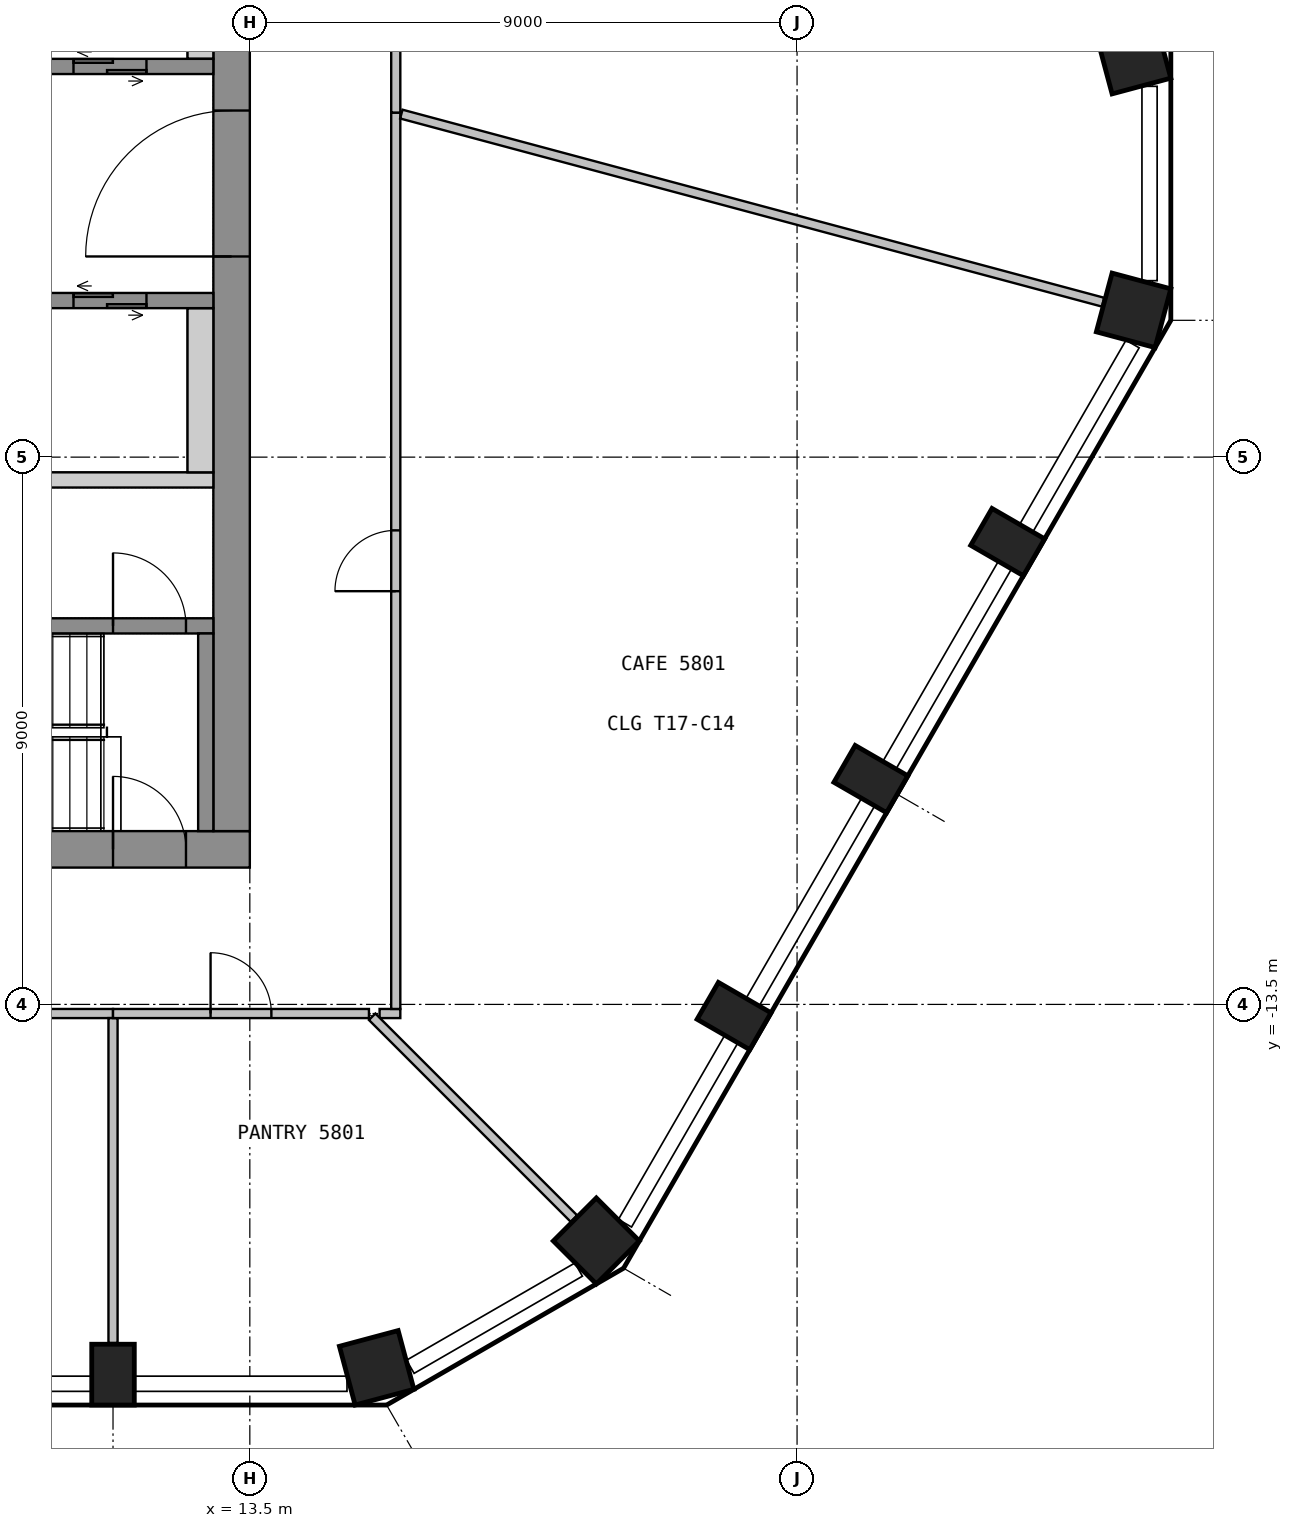
"""IFC4 building model, lengths in metres.
Left out: names, types, materials, properties, quantities, classifications, styles, units other than length and angle.
Written with IfcOpenShell. Run it as: python <this file> out.ifc"""

import sys

from ifc_helpers import new_model, si_unit, direction, frame, frame_2d, origin, origin_2d, place, context, subcontext, project, spatial, polyline, rectangle, outline, extrude, element, fill, save


model = new_model("IFC4")
c1 = context("Model", 3, precision=1e-05, world=origin(), true_north=direction((0.0, 1.0)))
c2 = subcontext(c1, "Body", "Model", "MODEL_VIEW")
j1 = project(units=[si_unit("LENGTHUNIT", "METRE"), si_unit("PLANEANGLEUNIT", "RADIAN")], contexts=[c1])
p1 = place(None, origin())
s1 = spatial("IfcSite", under=j1, at=p1, CompositionType="ELEMENT")
p2 = place(p1, origin())
s2 = spatial("IfcBuilding", under=s1, at=p2, CompositionType="ELEMENT")
p3 = place(p2, frame((0.0, 0.0, 235.2)))
s3 = spatial("IfcBuildingStorey", under=s2, at=p3, CompositionType="ELEMENT", Elevation=235.2)
p4 = place(p3, frame((11.25, -19.588, 0.0), z_axis=(0.0, 0.0, 1.0), x_axis=(1.0, 0.0, 0.0)))
e1 = element("IfcColumn", 1, at=p4, inside=s3, PredefinedType="COLUMN", context=c2, shape_type="SweptSolid", body=[
    extrude(rectangle(XDim=0.7, YDim=1.0, at=origin_2d()), origin(), (0.0, 0.0, 1.0), 3.575),
])
for number, where, z_axis, x_axis in (
    (2, (15.586, -19.476, 0.0), (0.0, 0.0, 1.0), (0.966, 0.259, 0.0)),
    (3, (19.199, -17.39, 0.0), (0.0, 0.0, 1.0), (0.707, 0.707, 0.0)),
):
    element("IfcColumn", number, at=place(p3, frame(where, z_axis=z_axis, x_axis=x_axis)), inside=s3, PredefinedType="COLUMN", context=c2, shape_type="SweptSolid", body=[
        extrude(rectangle(XDim=1.0, YDim=1.0, at=origin_2d()), origin(), (0.0, 0.0, 1.0), 3.575),
    ])
for number, where, z_axis, x_axis in (
    (4, (21.464, -13.691, 0.0), (0.0, 0.0, 1.0), (0.5, 0.866, 0.0)),
    (5, (23.714, -9.794, 0.0), (0.0, 0.0, 1.0), (0.5, 0.866, 0.0)),
    (6, (25.964, -5.897, 0.0), (0.0, 0.0, 1.0), (0.5, 0.866, 0.0)),
):
    element("IfcColumn", number, at=place(p3, frame(where, z_axis=z_axis, x_axis=x_axis)), inside=s3, PredefinedType="COLUMN", context=c2, shape_type="SweptSolid", body=[
        extrude(rectangle(XDim=0.7, YDim=1.0, at=origin_2d()), origin(), (0.0, 0.0, 1.0), 3.575),
    ])
for number, where, z_axis, x_axis in (
    (7, (28.035, -2.086, 0.0), (0.0, 0.0, 1.0), (0.259, 0.966, 0.0)),
    (8, (28.035, 2.086, 0.0), (0.0, 0.0, 1.0), (-0.259, 0.966, 0.0)),
):
    element("IfcColumn", number, at=place(p3, frame(where, z_axis=z_axis, x_axis=x_axis)), inside=s3, PredefinedType="COLUMN", context=c2, shape_type="SweptSolid", body=[
        extrude(rectangle(XDim=1.0, YDim=1.0, at=origin_2d()), origin(), (0.0, 0.0, 1.0), 3.575),
    ])
p5 = place(p3, frame((-13.5, -10.95, 0.0), z_axis=(0.0, 0.0, 1.0), x_axis=(1.0, 0.0, 0.0)))
e9 = element("IfcWall", 9, at=p5, inside=s3, PredefinedType="SHEAR", context=c2, shape_type="SweptSolid", body=[
    extrude(rectangle(XDim=27.0, YDim=0.6, at=frame_2d((13.5, 0.0))), origin(), (0.0, 0.0, 1.0), 3.575),
])
p6 = place(p5, frame((12.3, 0.0, 0.0)))
e10 = element("IfcOpeningElement", 10, at=p6, cuts=e9, PredefinedType="OPENING", context=c2, shape_type="SweptSolid", body=[
    extrude(rectangle(XDim=2.4, YDim=2.1, at=frame_2d((1.2, 1.05))), frame((0.0, 0.31, 0.0), z_axis=(0.0, -1.0, 0.0), x_axis=(1.0, 0.0, 0.0)), (0.0, 0.0, 1.0), 0.62),
])
p7 = place(p5, frame((1.05, 0.0, 0.0)))
e11 = element("IfcOpeningElement", 11, at=p7, cuts=e9, PredefinedType="OPENING", context=c2, shape_type="SweptSolid", body=[
    extrude(rectangle(XDim=1.2, YDim=2.1, at=frame_2d((0.6, 1.05))), frame((0.0, 0.31, 0.0), z_axis=(0.0, -1.0, 0.0), x_axis=(1.0, 0.0, 0.0)), (0.0, 0.0, 1.0), 0.62),
])
p8 = place(p5, frame((24.75, 0.0, 0.0)))
e12 = element("IfcOpeningElement", 12, at=p8, cuts=e9, PredefinedType="OPENING", context=c2, shape_type="SweptSolid", body=[
    extrude(rectangle(XDim=1.2, YDim=2.1, at=frame_2d((0.6, 1.05))), frame((0.0, 0.31, 0.0), z_axis=(0.0, -1.0, 0.0), x_axis=(1.0, 0.0, 0.0)), (0.0, 0.0, 1.0), 0.62),
])
p9 = place(p3, frame((13.2, -10.65, 0.0), z_axis=(0.0, 0.0, 1.0), x_axis=(0.0, 1.0, 0.0)))
e13 = element("IfcWall", 13, at=p9, inside=s3, PredefinedType="SHEAR", context=c2, shape_type="SweptSolid", body=[
    extrude(rectangle(XDim=21.3, YDim=0.6, at=frame_2d((10.65, 0.0))), origin(), (0.0, 0.0, 1.0), 3.575),
])
p10 = place(p9, frame((9.45, 0.0, 0.0)))
e14 = element("IfcOpeningElement", 14, at=p10, cuts=e13, PredefinedType="OPENING", context=c2, shape_type="SweptSolid", body=[
    extrude(rectangle(XDim=2.4, YDim=2.1, at=frame_2d((1.2, 1.05))), frame((0.0, 0.31, 0.0), z_axis=(0.0, -1.0, 0.0), x_axis=(1.0, 0.0, 0.0)), (0.0, 0.0, 1.0), 0.62),
])
p11 = place(p3, origin())
e15 = element("IfcWall", 15, at=p11, inside=s3, PredefinedType="SHEAR", context=c2, shape_type="SweptSolid", body=[
    extrude(outline(polyline([(12.475, 2.05), (12.9, 2.05), (12.9, 4.75), (12.475, 4.75), (12.475, 2.05)])), origin(), (0.0, 0.0, 1.0), 3.575),
])
p12 = place(p3, frame((9.675, 1.925, 0.0), z_axis=(0.0, 0.0, 1.0), x_axis=(1.0, 0.0, 0.0)))
e16 = element("IfcWall", 16, at=p12, inside=s3, PredefinedType="SHEAR", context=c2, shape_type="SweptSolid", body=[
    extrude(rectangle(XDim=3.225, YDim=0.25, at=frame_2d((1.612, 0.0))), origin(), (0.0, 0.0, 1.0), 3.575),
])
p13 = place(p12, frame((0.925, 0.0, 0.0)))
e17 = element("IfcOpeningElement", 17, at=p13, cuts=e16, PredefinedType="OPENING", context=c2, shape_type="SweptSolid", body=[
    extrude(rectangle(XDim=1.2, YDim=2.1, at=frame_2d((0.6, 1.05))), frame((0.0, 0.135, 0.0), z_axis=(0.0, -1.0, 0.0), x_axis=(1.0, 0.0, 0.0)), (0.0, 0.0, 1.0), 0.27),
])
p14 = place(p3, origin())
e18 = element("IfcWall", 18, at=p14, inside=s3, PredefinedType="SHEAR", context=c2, shape_type="SweptSolid", body=[
    extrude(outline(polyline([(-1.525, -5.0), (12.9, -5.0), (12.9, -4.75), (-1.525, -4.75), (-1.525, -5.0)])), origin(), (0.0, 0.0, 1.0), 3.575),
])
p15 = place(p3, origin())
e19 = element("IfcWall", 19, at=p15, inside=s3, PredefinedType="SHEAR", context=c2, shape_type="SweptSolid", body=[
    extrude(outline(polyline([(12.475, -4.75), (12.9, -4.75), (12.9, -2.05), (12.475, -2.05), (12.475, -4.75)])), origin(), (0.0, 0.0, 1.0), 3.575),
])
p16 = place(p3, frame((-1.525, -1.925, 0.0), z_axis=(0.0, 0.0, 1.0), x_axis=(1.0, 0.0, 0.0)))
e20 = element("IfcWall", 20, at=p16, inside=s3, PredefinedType="SHEAR", context=c2, shape_type="SweptSolid", body=[
    extrude(rectangle(XDim=14.425, YDim=0.25, at=frame_2d((7.212, 0.0))), origin(), (0.0, 0.0, 1.0), 3.575),
])
p17 = place(p16, frame((0.925, 0.0, 0.0)))
e21 = element("IfcOpeningElement", 21, at=p17, cuts=e20, PredefinedType="OPENING", context=c2, shape_type="SweptSolid", body=[
    extrude(rectangle(XDim=1.2, YDim=2.1, at=frame_2d((0.6, 1.05))), frame((0.0, 0.135, 0.0), z_axis=(0.0, -1.0, 0.0), x_axis=(1.0, 0.0, 0.0)), (0.0, 0.0, 1.0), 0.27),
])
p18 = place(p16, frame((3.725, 0.0, 0.0)))
e22 = element("IfcOpeningElement", 22, at=p18, cuts=e20, PredefinedType="OPENING", context=c2, shape_type="SweptSolid", body=[
    extrude(rectangle(XDim=1.2, YDim=2.1, at=frame_2d((0.6, 1.05))), frame((0.0, 0.135, 0.0), z_axis=(0.0, -1.0, 0.0), x_axis=(1.0, 0.0, 0.0)), (0.0, 0.0, 1.0), 0.27),
])
p19 = place(p16, frame((6.525, 0.0, 0.0)))
e23 = element("IfcOpeningElement", 23, at=p19, cuts=e20, PredefinedType="OPENING", context=c2, shape_type="SweptSolid", body=[
    extrude(rectangle(XDim=1.2, YDim=2.1, at=frame_2d((0.6, 1.05))), frame((0.0, 0.135, 0.0), z_axis=(0.0, -1.0, 0.0), x_axis=(1.0, 0.0, 0.0)), (0.0, 0.0, 1.0), 0.27),
])
p20 = place(p16, frame((9.325, 0.0, 0.0)))
e24 = element("IfcOpeningElement", 24, at=p20, cuts=e20, PredefinedType="OPENING", context=c2, shape_type="SweptSolid", body=[
    extrude(rectangle(XDim=1.2, YDim=2.1, at=frame_2d((0.6, 1.05))), frame((0.0, 0.135, 0.0), z_axis=(0.0, -1.0, 0.0), x_axis=(1.0, 0.0, 0.0)), (0.0, 0.0, 1.0), 0.27),
])
p21 = place(p16, frame((12.125, 0.0, 0.0)))
e25 = element("IfcOpeningElement", 25, at=p21, cuts=e20, PredefinedType="OPENING", context=c2, shape_type="SweptSolid", body=[
    extrude(rectangle(XDim=1.2, YDim=2.1, at=frame_2d((0.6, 1.05))), frame((0.0, 0.135, 0.0), z_axis=(0.0, -1.0, 0.0), x_axis=(1.0, 0.0, 0.0)), (0.0, 0.0, 1.0), 0.27),
])
p22 = place(p3, frame((2.8, -7.275, 0.0), z_axis=(0.0, 0.0, 1.0), x_axis=(1.0, 0.0, 0.0)))
e26 = element("IfcWall", 26, at=p22, inside=s3, PredefinedType="SHEAR", context=c2, shape_type="SweptSolid", body=[
    extrude(rectangle(XDim=10.1, YDim=0.25, at=frame_2d((5.05, 0.0))), origin(), (0.0, 0.0, 1.0), 3.575),
])
p23 = place(p22, frame((8.45, 0.0, 0.0)))
e27 = element("IfcOpeningElement", 27, at=p23, cuts=e26, PredefinedType="OPENING", context=c2, shape_type="SweptSolid", body=[
    extrude(rectangle(XDim=1.2, YDim=2.1, at=frame_2d((0.6, 1.05))), frame((0.0, 0.135, 0.0), z_axis=(0.0, -1.0, 0.0), x_axis=(1.0, 0.0, 0.0)), (0.0, 0.0, 1.0), 0.27),
])
p24 = place(p3, frame((12.775, -10.65, 0.0), z_axis=(0.0, 0.0, 1.0), x_axis=(0.0, 1.0, 0.0)))
e28 = element("IfcWall", 28, at=p24, inside=s3, PredefinedType="SHEAR", context=c2, shape_type="SweptSolid", body=[
    extrude(rectangle(XDim=3.25, YDim=0.25, at=frame_2d((1.625, 0.0))), origin(), (0.0, 0.0, 1.0), 3.575),
])
p25 = place(p3, frame((-6.75, -13.65, 0.0), z_axis=(0.0, 0.0, 1.0), x_axis=(1.0, 0.0, 0.0)))
e29 = element("IfcWall", 29, at=p25, inside=s3, PredefinedType="PARTITIONING", context=c2, shape_type="SweptSolid", body=[
    extrude(rectangle(XDim=18.0, YDim=0.15, at=frame_2d((9.0, 0.0))), origin(), (0.0, 0.0, 1.0), 3.575),
])
p26 = place(p25, frame((8.5, 0.0, 0.0)))
e30 = element("IfcOpeningElement", 30, at=p26, cuts=e29, PredefinedType="OPENING", context=c2, shape_type="SweptSolid", body=[
    extrude(rectangle(XDim=1.0, YDim=2.1, at=frame_2d((0.5, 1.05))), frame((0.0, 0.085, 0.0), z_axis=(0.0, -1.0, 0.0), x_axis=(1.0, 0.0, 0.0)), (0.0, 0.0, 1.0), 0.17),
])
p27 = place(p3, frame((11.25, -13.725, 0.0), z_axis=(0.0, 0.0, 1.0), x_axis=(0.0, -1.0, 0.0)))
e31 = element("IfcWall", 31, at=p27, inside=s3, PredefinedType="PARTITIONING", context=c2, shape_type="SweptSolid", body=[
    extrude(rectangle(XDim=5.344, YDim=0.15, at=frame_2d((2.672, 0.0))), origin(), (0.0, 0.0, 1.0), 3.575),
])
p28 = place(p3, frame((11.25, -13.65, 0.0), z_axis=(0.0, 0.0, 1.0), x_axis=(1.0, 0.0, 0.0)))
e32 = element("IfcWall", 32, at=p28, inside=s3, PredefinedType="PARTITIONING", context=c2, shape_type="SweptSolid", body=[
    extrude(rectangle(XDim=4.209, YDim=0.15, at=frame_2d((2.104, 0.0))), origin(), (0.0, 0.0, 1.0), 3.575),
])
p29 = place(p28, frame((1.604, 0.0, 0.0)))
e33 = element("IfcOpeningElement", 33, at=p29, cuts=e32, PredefinedType="OPENING", context=c2, shape_type="SweptSolid", body=[
    extrude(rectangle(XDim=1.0, YDim=2.1, at=frame_2d((0.5, 1.05))), frame((0.0, 0.085, 0.0), z_axis=(0.0, -1.0, 0.0), x_axis=(1.0, 0.0, 0.0)), (0.0, 0.0, 1.0), 0.17),
])
p30 = place(p3, frame((15.634, -13.65, 0.0), z_axis=(0.0, 0.0, 1.0), x_axis=(1.0, 0.0, 0.0)))
e34 = element("IfcWall", 34, at=p30, inside=s3, PredefinedType="PARTITIONING", context=c2, shape_type="SweptSolid", body=[
    extrude(rectangle(XDim=0.341, YDim=0.15, at=frame_2d((0.17, 0.0))), origin(), (0.0, 0.0, 1.0), 3.575),
])
p31 = place(p3, frame((15.512, -13.703, 0.0), z_axis=(0.0, 0.0, 1.0), x_axis=(0.707002756653, -0.707210790419, 0.0)))
e35 = element("IfcWall", 35, at=p31, inside=s3, PredefinedType="PARTITIONING", context=c2, shape_type="SweptSolid", body=[
    extrude(rectangle(XDim=4.694, YDim=0.15, at=frame_2d((2.347, 0.0))), origin(), (0.0, 0.0, 1.0), 3.575),
])
p32 = place(p3, frame((15.9, -13.575, 0.0), z_axis=(0.0, 0.0, 1.0), x_axis=(0.0, 1.0, 0.0)))
e36 = element("IfcWall", 36, at=p32, inside=s3, PredefinedType="PARTITIONING", context=c2, shape_type="SweptSolid", body=[
    extrude(rectangle(XDim=14.741, YDim=0.15, at=frame_2d((7.371, 0.0))), origin(), (0.0, 0.0, 1.0), 3.575),
])
p33 = place(p32, frame((6.871, 0.0, 0.0)))
e37 = element("IfcOpeningElement", 37, at=p33, cuts=e36, PredefinedType="OPENING", context=c2, shape_type="SweptSolid", body=[
    extrude(rectangle(XDim=1.0, YDim=2.1, at=frame_2d((0.5, 1.05))), frame((0.0, 0.085, 0.0), z_axis=(0.0, -1.0, 0.0), x_axis=(1.0, 0.0, 0.0)), (0.0, 0.0, 1.0), 0.17),
])
p34 = place(p3, frame((15.9, 1.166, 0.0), z_axis=(0.0, 0.0, 1.0), x_axis=(0.0, 1.0, 0.0)))
e38 = element("IfcWall", 38, at=p34, inside=s3, PredefinedType="PARTITIONING", context=c2, shape_type="SweptSolid", body=[
    extrude(rectangle(XDim=9.313, YDim=0.15, at=frame_2d((4.656, 0.0))), origin(), (0.0, 0.0, 1.0), 3.575),
])
p35 = place(p34, frame((4.156, 0.0, 0.0)))
e39 = element("IfcOpeningElement", 39, at=p35, cuts=e38, PredefinedType="OPENING", context=c2, shape_type="SweptSolid", body=[
    extrude(rectangle(XDim=1.0, YDim=2.1, at=frame_2d((0.5, 1.05))), frame((0.0, 0.085, 0.0), z_axis=(0.0, -1.0, 0.0), x_axis=(1.0, 0.0, 0.0)), (0.0, 0.0, 1.0), 0.17),
])
p36 = place(p3, frame((15.992, 1.141, 0.0), z_axis=(0.0, 0.0, 1.0), x_axis=(0.965910286237, -0.258877034405, 0.0)))
e40 = element("IfcWall", 40, at=p36, inside=s3, PredefinedType="PARTITIONING", context=c2, shape_type="SweptSolid", body=[
    extrude(rectangle(XDim=11.948, YDim=0.15, at=frame_2d((5.974, 0.0))), origin(), (0.0, 0.0, 1.0), 3.575),
])
p37 = place(p10, origin())
e41 = element("IfcDoor", 41, at=p37, inside=s3, OperationType="DOUBLE_DOOR_DOUBLE_SWING", PredefinedType="DOOR", context=c2, shape_type="SweptSolid", body=[
    extrude(rectangle(XDim=2.4, YDim=2.1, at=frame_2d((1.2, 1.05))), frame((0.0, 0.025, 0.0), z_axis=(0.0, -1.0, 0.0), x_axis=(1.0, 0.0, 0.0)), (0.0, 0.0, 1.0), 0.05),
])
fill(e14, e41)
p38 = place(p8, origin())
e42 = element("IfcDoor", 42, at=p38, inside=s3, OperationType="SINGLE_SWING_RIGHT", PredefinedType="DOOR", context=c2, shape_type="SweptSolid", body=[
    extrude(rectangle(XDim=1.2, YDim=2.1, at=frame_2d((0.6, 1.05))), frame((0.0, 0.025, 0.0), z_axis=(0.0, -1.0, 0.0), x_axis=(1.0, 0.0, 0.0)), (0.0, 0.0, 1.0), 0.05),
])
fill(e12, e42)
p39 = place(p13, origin())
e43 = element("IfcDoor", 43, at=p39, inside=s3, OperationType="DOUBLE_DOOR_SLIDING", PredefinedType="DOOR", context=c2, shape_type="SweptSolid", body=[
    extrude(rectangle(XDim=1.2, YDim=2.1, at=frame_2d((0.6, 1.05))), frame((0.0, 0.025, 0.0), z_axis=(0.0, -1.0, 0.0), x_axis=(1.0, 0.0, 0.0)), (0.0, 0.0, 1.0), 0.05),
])
fill(e17, e43)
p40 = place(p21, origin())
e44 = element("IfcDoor", 44, at=p40, inside=s3, OperationType="DOUBLE_DOOR_SLIDING", PredefinedType="DOOR", context=c2, shape_type="SweptSolid", body=[
    extrude(rectangle(XDim=1.2, YDim=2.1, at=frame_2d((0.6, 1.05))), frame((0.0, 0.025, 0.0), z_axis=(0.0, -1.0, 0.0), x_axis=(1.0, 0.0, 0.0)), (0.0, 0.0, 1.0), 0.05),
])
fill(e25, e44)
p41 = place(p23, origin())
e45 = element("IfcDoor", 45, at=p41, inside=s3, OperationType="SINGLE_SWING_LEFT", PredefinedType="DOOR", context=c2, shape_type="SweptSolid", body=[
    extrude(rectangle(XDim=1.2, YDim=2.1, at=frame_2d((0.6, 1.05))), frame((0.0, 0.025, 0.0), z_axis=(0.0, -1.0, 0.0), x_axis=(1.0, 0.0, 0.0)), (0.0, 0.0, 1.0), 0.05),
])
fill(e27, e45)
p42 = place(p29, origin())
e46 = element("IfcDoor", 46, at=p42, inside=s3, OperationType="SINGLE_SWING_LEFT", PredefinedType="DOOR", context=c2, shape_type="SweptSolid", body=[
    extrude(rectangle(XDim=1.0, YDim=2.1, at=frame_2d((0.5, 1.05))), frame((0.0, 0.025, 0.0), z_axis=(0.0, -1.0, 0.0), x_axis=(1.0, 0.0, 0.0)), (0.0, 0.0, 1.0), 0.05),
])
fill(e33, e46)
p43 = place(p33, origin())
e47 = element("IfcDoor", 47, at=p43, inside=s3, OperationType="SINGLE_SWING_RIGHT", PredefinedType="DOOR", context=c2, shape_type="SweptSolid", body=[
    extrude(rectangle(XDim=1.0, YDim=2.1, at=frame_2d((0.5, 1.05))), frame((0.0, 0.025, 0.0), z_axis=(0.0, -1.0, 0.0), x_axis=(1.0, 0.0, 0.0)), (0.0, 0.0, 1.0), 0.05),
])
fill(e37, e47)
save(model, sys.argv[1])
